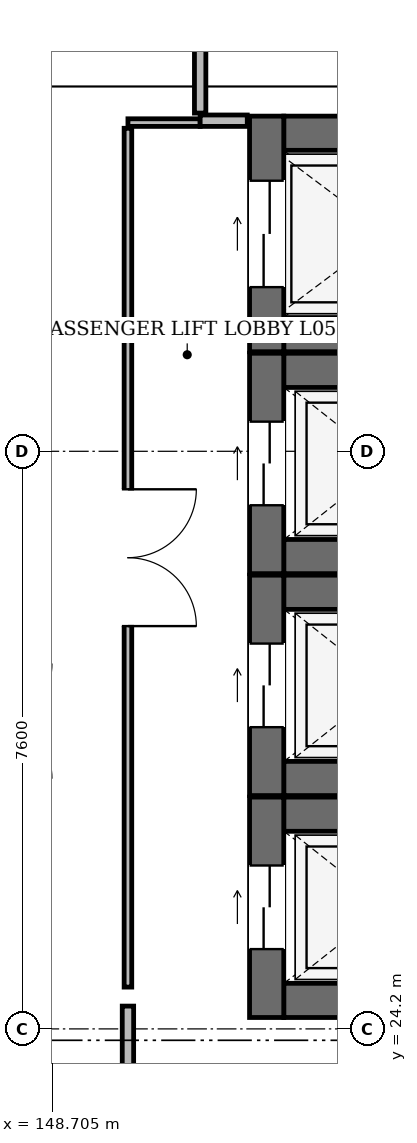
"""IFC4 building model, lengths in metres.
Left out: names, types, materials, properties, quantities, classifications, styles, units other than length and angle.
Written with IfcOpenShell. Run it as: python <this file> out.ifc"""

import sys

from ifc_helpers import new_model, si_unit, direction, frame, frame_2d, origin, place, context, subcontext, project, spatial, rectangle, extrude, element, fill, save


model = new_model("IFC4")
c1 = context("Model", 3, precision=1e-05, world=origin(), true_north=direction((0.0, 1.0)))
c2 = subcontext(c1, "Body", "Model", "MODEL_VIEW")
j1 = project(units=[si_unit("LENGTHUNIT", "METRE"), si_unit("PLANEANGLEUNIT", "RADIAN")], contexts=[c1])
p1 = place(None, origin())
s1 = spatial("IfcSite", under=j1, at=p1, CompositionType="ELEMENT")
p2 = place(p1, origin())
s2 = spatial("IfcBuilding", under=s1, at=p2, CompositionType="ELEMENT")
p3 = place(p2, frame((0.0, 0.0, 24.0)))
s3 = spatial("IfcBuildingStorey", under=s2, at=p3, CompositionType="ELEMENT", Elevation=24.0)
for number, where, z_axis, x_axis in (
    (1, (151.75, 24.575, 0.0), (0.0, 0.0, 1.0), (1.0, 0.0, 0.0)),
    (2, (151.75, 27.025, 0.0), (0.0, 0.0, 1.0), (1.0, 0.0, 0.0)),
):
    element("IfcWall", number, at=place(p3, frame(where, z_axis=z_axis, x_axis=x_axis)), inside=s3, PredefinedType="SHEAR", context=c2, shape_type="SweptSolid", body=[
        extrude(rectangle(XDim=2.7, YDim=0.45, at=frame_2d((1.35, 0.0))), origin(), (0.0, 0.0, 1.0), 3.93),
    ])
p4 = place(p3, frame((151.525, 24.35, 0.0), z_axis=(0.0, 0.0, 1.0), x_axis=(0.0, 1.0, 0.0)))
e3 = element("IfcWall", 3, at=p4, inside=s3, PredefinedType="SHEAR", context=c2, shape_type="SweptSolid", body=[
    extrude(rectangle(XDim=2.9, YDim=0.45, at=frame_2d((1.45, 0.0))), origin(), (0.0, 0.0, 1.0), 3.93),
])
p5 = place(p4, frame((0.9, 0.0, 0.0)))
e4 = element("IfcOpeningElement", 4, at=p5, cuts=e3, PredefinedType="OPENING", context=c2, shape_type="SweptSolid", body=[
    extrude(rectangle(XDim=1.1, YDim=2.2, at=frame_2d((0.55, 1.1))), frame((0.0, 0.237, 0.0), z_axis=(0.0, -1.0, 0.0), x_axis=(1.0, 0.0, 0.0)), (0.0, 0.0, 1.0), 0.474),
])
for number, where, z_axis, x_axis in (
    (5, (151.75, 27.495, 0.0), (0.0, 0.0, 1.0), (1.0, 0.0, 0.0)),
    (6, (151.75, 29.945, 0.0), (0.0, 0.0, 1.0), (1.0, 0.0, 0.0)),
):
    element("IfcWall", number, at=place(p3, frame(where, z_axis=z_axis, x_axis=x_axis)), inside=s3, PredefinedType="SHEAR", context=c2, shape_type="SweptSolid", body=[
        extrude(rectangle(XDim=2.7, YDim=0.45, at=frame_2d((1.35, 0.0))), origin(), (0.0, 0.0, 1.0), 3.93),
    ])
p6 = place(p3, frame((151.525, 27.27, 0.0), z_axis=(0.0, 0.0, 1.0), x_axis=(0.0, 1.0, 0.0)))
e7 = element("IfcWall", 7, at=p6, inside=s3, PredefinedType="SHEAR", context=c2, shape_type="SweptSolid", body=[
    extrude(rectangle(XDim=2.9, YDim=0.45, at=frame_2d((1.45, 0.0))), origin(), (0.0, 0.0, 1.0), 3.93),
])
p7 = place(p6, frame((0.9, 0.0, 0.0)))
e8 = element("IfcOpeningElement", 8, at=p7, cuts=e7, PredefinedType="OPENING", context=c2, shape_type="SweptSolid", body=[
    extrude(rectangle(XDim=1.1, YDim=2.2, at=frame_2d((0.55, 1.1))), frame((0.0, 0.237, 0.0), z_axis=(0.0, -1.0, 0.0), x_axis=(1.0, 0.0, 0.0)), (0.0, 0.0, 1.0), 0.474),
])
for number, where, z_axis, x_axis in (
    (9, (151.75, 30.415, 0.0), (0.0, 0.0, 1.0), (1.0, 0.0, 0.0)),
    (10, (151.75, 32.865, 0.0), (0.0, 0.0, 1.0), (1.0, 0.0, 0.0)),
):
    element("IfcWall", number, at=place(p3, frame(where, z_axis=z_axis, x_axis=x_axis)), inside=s3, PredefinedType="SHEAR", context=c2, shape_type="SweptSolid", body=[
        extrude(rectangle(XDim=2.7, YDim=0.45, at=frame_2d((1.35, 0.0))), origin(), (0.0, 0.0, 1.0), 3.93),
    ])
p8 = place(p3, frame((151.525, 30.19, 0.0), z_axis=(0.0, 0.0, 1.0), x_axis=(0.0, 1.0, 0.0)))
e11 = element("IfcWall", 11, at=p8, inside=s3, PredefinedType="SHEAR", context=c2, shape_type="SweptSolid", body=[
    extrude(rectangle(XDim=2.9, YDim=0.45, at=frame_2d((1.45, 0.0))), origin(), (0.0, 0.0, 1.0), 3.93),
])
p9 = place(p8, frame((0.9, 0.0, 0.0)))
e12 = element("IfcOpeningElement", 12, at=p9, cuts=e11, PredefinedType="OPENING", context=c2, shape_type="SweptSolid", body=[
    extrude(rectangle(XDim=1.1, YDim=2.2, at=frame_2d((0.55, 1.1))), frame((0.0, 0.237, 0.0), z_axis=(0.0, -1.0, 0.0), x_axis=(1.0, 0.0, 0.0)), (0.0, 0.0, 1.0), 0.474),
])
for number, where, z_axis, x_axis in (
    (13, (151.75, 33.335, 0.0), (0.0, 0.0, 1.0), (1.0, 0.0, 0.0)),
    (14, (151.75, 35.985, 0.0), (0.0, 0.0, 1.0), (1.0, 0.0, 0.0)),
):
    element("IfcWall", number, at=place(p3, frame(where, z_axis=z_axis, x_axis=x_axis)), inside=s3, PredefinedType="SHEAR", context=c2, shape_type="SweptSolid", body=[
        extrude(rectangle(XDim=2.7, YDim=0.45, at=frame_2d((1.35, 0.0))), origin(), (0.0, 0.0, 1.0), 3.93),
    ])
p10 = place(p3, frame((151.525, 33.11, 0.0), z_axis=(0.0, 0.0, 1.0), x_axis=(0.0, 1.0, 0.0)))
e15 = element("IfcWall", 15, at=p10, inside=s3, PredefinedType="SHEAR", context=c2, shape_type="SweptSolid", body=[
    extrude(rectangle(XDim=3.1, YDim=0.45, at=frame_2d((1.55, 0.0))), origin(), (0.0, 0.0, 1.0), 3.93),
])
p11 = place(p10, frame((0.85, 0.0, 0.0)))
e16 = element("IfcOpeningElement", 16, at=p11, cuts=e15, PredefinedType="OPENING", context=c2, shape_type="SweptSolid", body=[
    extrude(rectangle(XDim=1.4, YDim=2.3, at=frame_2d((0.7, 1.15))), frame((0.0, 0.237, 0.0), z_axis=(0.0, -1.0, 0.0), x_axis=(1.0, 0.0, 0.0)), (0.0, 0.0, 1.0), 0.474),
])
p12 = place(p3, frame((149.7, 24.75, 0.0), z_axis=(0.0, 0.0, 1.0), x_axis=(0.0, 1.0, 0.0)))
e17 = element("IfcWall", 17, at=p12, inside=s3, PredefinedType="PARTITIONING", context=c2, shape_type="SweptSolid", body=[
    extrude(rectangle(XDim=11.3, YDim=0.1, at=frame_2d((5.65, 0.0))), origin(), (0.0, 0.0, 1.0), 3.805),
])
p13 = place(p12, frame((4.75, 0.0, 0.0)))
e18 = element("IfcOpeningElement", 18, at=p13, cuts=e17, PredefinedType="OPENING", context=c2, shape_type="SweptSolid", body=[
    extrude(rectangle(XDim=1.8, YDim=2.4, at=frame_2d((0.9, 1.2))), frame((0.0, 0.062, 0.0), z_axis=(0.0, -1.0, 0.0), x_axis=(1.0, 0.0, 0.0)), (0.0, 0.0, 1.0), 0.124),
])
p14 = place(p3, frame((149.7, 36.125, 0.0), z_axis=(0.0, 0.0, 1.0), x_axis=(1.0, 0.0, 0.0)))
e19 = element("IfcWall", 19, at=p14, inside=s3, PredefinedType="PARTITIONING", context=c2, shape_type="SweptSolid", body=[
    extrude(rectangle(XDim=0.95, YDim=0.1, at=frame_2d((0.475, 0.0))), origin(), (0.0, 0.0, 1.0), 3.805),
])
p15 = place(p3, frame((150.65, 36.15, 0.0), z_axis=(0.0, 0.0, 1.0), x_axis=(1.0, 0.0, 0.0)))
e20 = element("IfcWall", 20, at=p15, inside=s3, PredefinedType="PARTITIONING", context=c2, shape_type="SweptSolid", body=[
    extrude(rectangle(XDim=0.62, YDim=0.15, at=frame_2d((0.31, 0.0))), origin(), (0.0, 0.0, 1.0), 3.805),
])
p16 = place(p3, frame((149.7, 24.5, 0.0), z_axis=(0.0, 0.0, 1.0), x_axis=(0.0, -1.0, 0.0)))
e21 = element("IfcWall", 21, at=p16, inside=s3, PredefinedType="PARTITIONING", context=c2, shape_type="SweptSolid", body=[
    extrude(rectangle(XDim=0.8, YDim=0.15, at=frame_2d((0.4, 0.0))), origin(), (0.0, 0.0, 1.0), 3.805),
])
p17 = place(p3, frame((150.65, 62.2, 0.0), z_axis=(0.0, 0.0, 1.0), x_axis=(0.0, -1.0, 0.0)))
e22 = element("IfcWall", 22, at=p17, inside=s3, PredefinedType="PARTITIONING", context=c2, shape_type="SweptSolid", body=[
    extrude(rectangle(XDim=25.95, YDim=0.15, at=frame_2d((12.975, 0.0))), origin(), (0.0, 0.0, 1.0), 3.805),
])
p18 = place(p17, frame((12.275, 0.0, 0.0)))
e23 = element("IfcOpeningElement", 23, at=p18, cuts=e22, PredefinedType="OPENING", context=c2, shape_type="SweptSolid", body=[
    extrude(rectangle(XDim=1.4, YDim=2.2, at=frame_2d((0.7, 1.1))), frame((0.0, 0.087, 0.0), z_axis=(0.0, -1.0, 0.0), x_axis=(1.0, 0.0, 0.0)), (0.0, 0.0, 1.0), 0.174),
])
p19 = place(p5, origin())
e24 = element("IfcDoor", 24, at=p19, inside=s3, OperationType="DOUBLE_DOOR_SLIDING", PredefinedType="DOOR", context=c2, shape_type="SweptSolid", body=[
    extrude(rectangle(XDim=1.1, YDim=2.2, at=frame_2d((0.55, 1.1))), frame((0.0, 0.025, 0.0), z_axis=(0.0, -1.0, 0.0), x_axis=(1.0, 0.0, 0.0)), (0.0, 0.0, 1.0), 0.05),
])
fill(e4, e24)
p20 = place(p7, origin())
e25 = element("IfcDoor", 25, at=p20, inside=s3, OperationType="DOUBLE_DOOR_SLIDING", PredefinedType="DOOR", context=c2, shape_type="SweptSolid", body=[
    extrude(rectangle(XDim=1.1, YDim=2.2, at=frame_2d((0.55, 1.1))), frame((0.0, 0.025, 0.0), z_axis=(0.0, -1.0, 0.0), x_axis=(1.0, 0.0, 0.0)), (0.0, 0.0, 1.0), 0.05),
])
fill(e8, e25)
p21 = place(p9, origin())
e26 = element("IfcDoor", 26, at=p21, inside=s3, OperationType="DOUBLE_DOOR_SLIDING", PredefinedType="DOOR", context=c2, shape_type="SweptSolid", body=[
    extrude(rectangle(XDim=1.1, YDim=2.2, at=frame_2d((0.55, 1.1))), frame((0.0, 0.025, 0.0), z_axis=(0.0, -1.0, 0.0), x_axis=(1.0, 0.0, 0.0)), (0.0, 0.0, 1.0), 0.05),
])
fill(e12, e26)
p22 = place(p11, origin())
e27 = element("IfcDoor", 27, at=p22, inside=s3, OperationType="DOUBLE_DOOR_SLIDING", PredefinedType="DOOR", context=c2, shape_type="SweptSolid", body=[
    extrude(rectangle(XDim=1.4, YDim=2.3, at=frame_2d((0.7, 1.15))), frame((0.0, 0.025, 0.0), z_axis=(0.0, -1.0, 0.0), x_axis=(1.0, 0.0, 0.0)), (0.0, 0.0, 1.0), 0.05),
])
fill(e16, e27)
p23 = place(p13, frame((1.8, 0.0, 0.0), z_axis=(0.0, 0.0, 1.0), x_axis=(-1.0, 0.0, 0.0)))
e28 = element("IfcDoor", 28, at=p23, inside=s3, OperationType="DOUBLE_DOOR_SINGLE_SWING", PredefinedType="DOOR", context=c2, shape_type="SweptSolid", body=[
    extrude(rectangle(XDim=1.8, YDim=2.4, at=frame_2d((0.9, 1.2))), frame((0.0, 0.025, 0.0), z_axis=(0.0, -1.0, 0.0), x_axis=(1.0, 0.0, 0.0)), (0.0, 0.0, 1.0), 0.05),
])
fill(e18, e28)
save(model, sys.argv[1])
